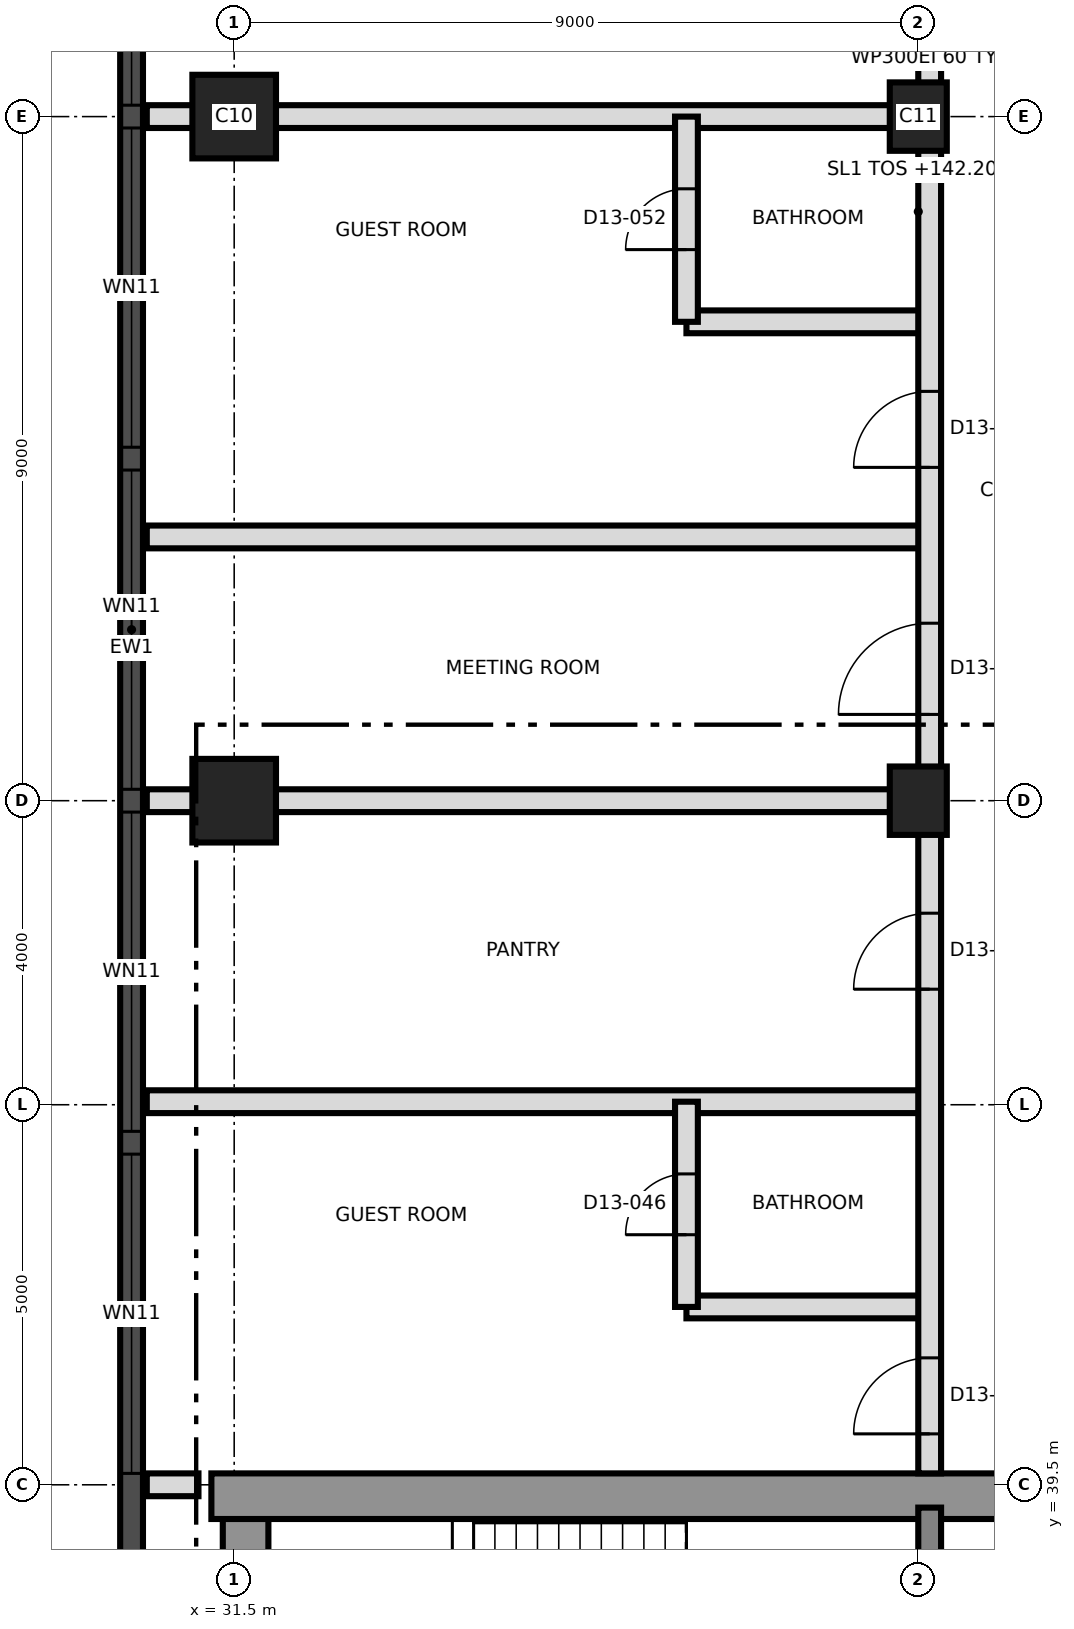
"""IFC4 building model, lengths in metres.
Left out: names, types, materials, properties, quantities, classifications, styles, units other than length and angle.
Written with IfcOpenShell. Run it as: python <this file> out.ifc"""

import sys

from ifc_helpers import new_model, si_unit, direction, frame, frame_2d, origin, origin_2d, place, context, subcontext, project, spatial, rectangle, extrude, element, fill, save


model = new_model("IFC4")
c1 = context("Model", 3, precision=1e-05, world=origin(), true_north=direction((0.0, 1.0)))
c2 = subcontext(c1, "Body", "Model", "MODEL_VIEW")
j1 = project(units=[si_unit("LENGTHUNIT", "METRE"), si_unit("PLANEANGLEUNIT", "RADIAN")], contexts=[c1])
p1 = place(None, origin())
s1 = spatial("IfcSite", under=j1, at=p1, CompositionType="ELEMENT")
p2 = place(p1, origin())
s2 = spatial("IfcBuilding", under=s1, at=p2, CompositionType="ELEMENT")
p3 = place(p2, frame((0.0, 0.0, 142.2)))
s3 = spatial("IfcBuildingStorey", under=s2, at=p3, CompositionType="ELEMENT", Elevation=142.2)
p4 = place(p3, frame((31.65, 21.8, 0.0), z_axis=(0.0, 0.0, 1.0), x_axis=(0.0, 1.0, 0.0)))
e1 = element("IfcWall", 1, at=p4, inside=s3, PredefinedType="SHEAR", context=c2, shape_type="SweptSolid", body=[
    extrude(rectangle(XDim=17.4, YDim=0.6, at=frame_2d((8.7, 0.0))), origin(), (0.0, 0.0, 1.0), 3.7),
])
p5 = place(p3, frame((31.2, 39.35, 0.0), z_axis=(0.0, 0.0, 1.0), x_axis=(1.0, 0.0, 0.0)))
e2 = element("IfcWall", 2, at=p5, inside=s3, PredefinedType="SHEAR", context=c2, shape_type="SweptSolid", body=[
    extrude(rectangle(XDim=27.0, YDim=0.6, at=frame_2d((13.5, 0.0))), origin(), (0.0, 0.0, 1.0), 3.7),
])
p6 = place(p5, frame((10.5, 0.0, 0.0)))
e3 = element("IfcOpeningElement", 3, at=p6, cuts=e2, PredefinedType="OPENING", context=c2, shape_type="SweptSolid", body=[
    extrude(rectangle(XDim=1.2, YDim=2.1, at=frame_2d((0.6, 1.05))), frame((0.0, 0.31, 0.0), z_axis=(0.0, -1.0, 0.0), x_axis=(1.0, 0.0, 0.0)), (0.0, 0.0, 1.0), 0.62),
])
p7 = place(p3, frame((40.65, 33.5, 0.0), z_axis=(0.0, 0.0, 1.0), x_axis=(0.0, 1.0, 0.0)))
e4 = element("IfcWall", 4, at=p7, inside=s3, PredefinedType="SHEAR", context=c2, shape_type="SweptSolid", body=[
    extrude(rectangle(XDim=5.7, YDim=0.3, at=frame_2d((2.85, 0.0))), origin(), (0.0, 0.0, 1.0), 3.7),
])
p8 = place(p3, frame((31.5, 48.5, 0.0), z_axis=(0.0, 0.0, 1.0), x_axis=(1.0, 0.0, 0.0)))
e5 = element("IfcColumn", 5, at=p8, inside=s3, PredefinedType="COLUMN", context=c2, shape_type="SweptSolid", body=[
    extrude(rectangle(XDim=1.1, YDim=1.1, at=origin_2d()), origin(), (0.0, 0.0, 1.0), 3.7),
])
p9 = place(p3, frame((40.5, 48.5, 0.0), z_axis=(0.0, 0.0, 1.0), x_axis=(0.0, 1.0, 0.0)))
e6 = element("IfcColumn", 6, at=p9, inside=s3, PredefinedType="COLUMN", context=c2, shape_type="SweptSolid", body=[
    extrude(rectangle(XDim=0.9, YDim=0.75, at=origin_2d()), origin(), (0.0, 0.0, 1.0), 3.7),
])
p10 = place(p3, frame((31.5, 57.5, 0.0), z_axis=(0.0, 0.0, 1.0), x_axis=(1.0, 0.0, 0.0)))
e7 = element("IfcColumn", 7, at=p10, inside=s3, PredefinedType="COLUMN", context=c2, shape_type="SweptSolid", body=[
    extrude(rectangle(XDim=1.1, YDim=1.1, at=origin_2d()), origin(), (0.0, 0.0, 1.0), 3.7),
])
p11 = place(p3, frame((40.5, 57.5, 0.0), z_axis=(0.0, 0.0, 1.0), x_axis=(0.0, 1.0, 0.0)))
e8 = element("IfcColumn", 8, at=p11, inside=s3, PredefinedType="COLUMN", context=c2, shape_type="SweptSolid", body=[
    extrude(rectangle(XDim=0.9, YDim=0.75, at=origin_2d()), origin(), (0.0, 0.0, 1.0), 3.7),
])
p12 = place(p3, frame((30.15, 66.992, 0.0), z_axis=(0.0, 0.0, 1.0), x_axis=(0.0, -1.0, 0.0)))
e9 = element("IfcWall", 9, at=p12, inside=s3, PredefinedType="SOLIDWALL", context=c2, shape_type="SweptSolid", body=[
    extrude(rectangle(XDim=32.968, YDim=0.3, at=frame_2d((16.484, 0.0))), origin(), (0.0, 0.0, 1.0), 3.4),
])
p13 = place(p12, frame((1.596, 0.0, 0.3)))
e10 = element("IfcOpeningElement", 10, at=p13, cuts=e9, PredefinedType="OPENING", context=c2, shape_type="SweptSolid", body=[
    extrude(rectangle(XDim=1.8, YDim=2.4, at=frame_2d((0.9, 1.2))), frame((0.0, 0.16, 0.0), z_axis=(0.0, -1.0, 0.0), x_axis=(1.0, 0.0, 0.0)), (0.0, 0.0, 1.0), 0.32),
])
p14 = place(p12, frame((5.142, 0.0, 0.9)))
e11 = element("IfcOpeningElement", 11, at=p14, cuts=e9, PredefinedType="OPENING", context=c2, shape_type="SweptSolid", body=[
    extrude(rectangle(XDim=4.2, YDim=1.5, at=frame_2d((2.1, 0.75))), frame((0.0, 0.16, 0.0), z_axis=(0.0, -1.0, 0.0), x_axis=(1.0, 0.0, 0.0)), (0.0, 0.0, 1.0), 0.32),
])
p15 = place(p12, frame((9.642, 0.0, 0.9)))
e12 = element("IfcOpeningElement", 12, at=p15, cuts=e9, PredefinedType="OPENING", context=c2, shape_type="SweptSolid", body=[
    extrude(rectangle(XDim=4.2, YDim=1.5, at=frame_2d((2.1, 0.75))), frame((0.0, 0.16, 0.0), z_axis=(0.0, -1.0, 0.0), x_axis=(1.0, 0.0, 0.0)), (0.0, 0.0, 1.0), 0.32),
])
p16 = place(p12, frame((14.142, 0.0, 0.9)))
e13 = element("IfcOpeningElement", 13, at=p16, cuts=e9, PredefinedType="OPENING", context=c2, shape_type="SweptSolid", body=[
    extrude(rectangle(XDim=4.2, YDim=1.5, at=frame_2d((2.1, 0.75))), frame((0.0, 0.16, 0.0), z_axis=(0.0, -1.0, 0.0), x_axis=(1.0, 0.0, 0.0)), (0.0, 0.0, 1.0), 0.32),
])
p17 = place(p12, frame((18.642, 0.0, 0.9)))
e14 = element("IfcOpeningElement", 14, at=p17, cuts=e9, PredefinedType="OPENING", context=c2, shape_type="SweptSolid", body=[
    extrude(rectangle(XDim=4.2, YDim=1.5, at=frame_2d((2.1, 0.75))), frame((0.0, 0.16, 0.0), z_axis=(0.0, -1.0, 0.0), x_axis=(1.0, 0.0, 0.0)), (0.0, 0.0, 1.0), 0.32),
])
p18 = place(p12, frame((23.142, 0.0, 0.9)))
e15 = element("IfcOpeningElement", 15, at=p18, cuts=e9, PredefinedType="OPENING", context=c2, shape_type="SweptSolid", body=[
    extrude(rectangle(XDim=4.2, YDim=1.5, at=frame_2d((2.1, 0.75))), frame((0.0, 0.16, 0.0), z_axis=(0.0, -1.0, 0.0), x_axis=(1.0, 0.0, 0.0)), (0.0, 0.0, 1.0), 0.32),
])
p19 = place(p12, frame((29.33, 0.0, 0.3)))
e16 = element("IfcOpeningElement", 16, at=p19, cuts=e9, PredefinedType="OPENING", context=c2, shape_type="SweptSolid", body=[
    extrude(rectangle(XDim=1.8, YDim=2.4, at=frame_2d((0.9, 1.2))), frame((0.0, 0.16, 0.0), z_axis=(0.0, -1.0, 0.0), x_axis=(1.0, 0.0, 0.0)), (0.0, 0.0, 1.0), 0.32),
])
p20 = place(p3, frame((30.35, 39.5, 0.0), z_axis=(0.0, 0.0, 1.0), x_axis=(1.0, 0.0, 0.0)))
e17 = element("IfcWall", 17, at=p20, inside=s3, PredefinedType="PARTITIONING", context=c2, shape_type="SweptSolid", body=[
    extrude(rectangle(XDim=0.68, YDim=0.3, at=frame_2d((0.34, 0.0))), origin(), (0.0, 0.0, 1.0), 3.4),
])
p21 = place(p3, frame((37.45, 41.84, 0.0), z_axis=(0.0, 0.0, 1.0), x_axis=(1.0, 0.0, 0.0)))
e18 = element("IfcWall", 18, at=p21, inside=s3, PredefinedType="PARTITIONING", context=c2, shape_type="SweptSolid", body=[
    extrude(rectangle(XDim=3.2, YDim=0.3, at=frame_2d((1.6, 0.0))), origin(), (0.0, 0.0, 1.0), 3.4),
])
for number, where, z_axis, x_axis in (
    (19, (30.35, 44.54, 0.0), (0.0, 0.0, 1.0), (1.0, 0.0, 0.0)),
    (20, (30.35, 48.5, 0.0), (0.0, 0.0, 1.0), (1.0, 0.0, 0.0)),
    (21, (30.35, 51.97, 0.0), (0.0, 0.0, 1.0), (1.0, 0.0, 0.0)),
):
    element("IfcWall", number, at=place(p3, frame(where, z_axis=z_axis, x_axis=x_axis)), inside=s3, PredefinedType="PARTITIONING", context=c2, shape_type="SweptSolid", body=[
        extrude(rectangle(XDim=10.3, YDim=0.3, at=frame_2d((5.15, 0.0))), origin(), (0.0, 0.0, 1.0), 3.4),
    ])
p22 = place(p3, frame((37.45, 54.8, 0.0), z_axis=(0.0, 0.0, 1.0), x_axis=(1.0, 0.0, 0.0)))
e22 = element("IfcWall", 22, at=p22, inside=s3, PredefinedType="PARTITIONING", context=c2, shape_type="SweptSolid", body=[
    extrude(rectangle(XDim=3.2, YDim=0.3, at=frame_2d((1.6, 0.0))), origin(), (0.0, 0.0, 1.0), 3.4),
])
p23 = place(p3, frame((30.35, 57.5, 0.0), z_axis=(0.0, 0.0, 1.0), x_axis=(1.0, 0.0, 0.0)))
e23 = element("IfcWall", 23, at=p23, inside=s3, PredefinedType="PARTITIONING", context=c2, shape_type="SweptSolid", body=[
    extrude(rectangle(XDim=10.3, YDim=0.3, at=frame_2d((5.15, 0.0))), origin(), (0.0, 0.0, 1.0), 3.4),
])
p24 = place(p3, frame((37.45, 41.84, 0.0), z_axis=(0.0, 0.0, 1.0), x_axis=(0.0, 1.0, 0.0)))
e24 = element("IfcWall", 24, at=p24, inside=s3, PredefinedType="PARTITIONING", context=c2, shape_type="SweptSolid", body=[
    extrude(rectangle(XDim=2.7, YDim=0.3, at=frame_2d((1.35, 0.0))), origin(), (0.0, 0.0, 1.0), 3.4),
])
p25 = place(p24, frame((0.95, 0.0, 0.0)))
e25 = element("IfcOpeningElement", 25, at=p25, cuts=e24, PredefinedType="OPENING", context=c2, shape_type="SweptSolid", body=[
    extrude(rectangle(XDim=0.8, YDim=2.1, at=frame_2d((0.4, 1.05))), frame((0.0, 0.16, 0.0), z_axis=(0.0, -1.0, 0.0), x_axis=(1.0, 0.0, 0.0)), (0.0, 0.0, 1.0), 0.32),
])
p26 = place(p3, frame((37.45, 54.8, 0.0), z_axis=(0.0, 0.0, 1.0), x_axis=(0.0, 1.0, 0.0)))
e26 = element("IfcWall", 26, at=p26, inside=s3, PredefinedType="PARTITIONING", context=c2, shape_type="SweptSolid", body=[
    extrude(rectangle(XDim=2.7, YDim=0.3, at=frame_2d((1.35, 0.0))), origin(), (0.0, 0.0, 1.0), 3.4),
])
p27 = place(p26, frame((0.95, 0.0, 0.0)))
e27 = element("IfcOpeningElement", 27, at=p27, cuts=e26, PredefinedType="OPENING", context=c2, shape_type="SweptSolid", body=[
    extrude(rectangle(XDim=0.8, YDim=2.1, at=frame_2d((0.4, 1.05))), frame((0.0, 0.16, 0.0), z_axis=(0.0, -1.0, 0.0), x_axis=(1.0, 0.0, 0.0)), (0.0, 0.0, 1.0), 0.32),
])
p28 = place(p3, frame((40.65, 39.65, 0.0), z_axis=(0.0, 0.0, 1.0), x_axis=(0.0, 1.0, 0.0)))
e28 = element("IfcWall", 28, at=p28, inside=s3, PredefinedType="PARTITIONING", context=c2, shape_type="SweptSolid", body=[
    extrude(rectangle(XDim=37.24, YDim=0.3, at=frame_2d((18.62, 0.0))), origin(), (0.0, 0.0, 1.0), 3.4),
])
p29 = place(p28, frame((0.52, 0.0, 0.0)))
e29 = element("IfcOpeningElement", 29, at=p29, cuts=e28, PredefinedType="OPENING", context=c2, shape_type="SweptSolid", body=[
    extrude(rectangle(XDim=1.0, YDim=2.1, at=frame_2d((0.5, 1.05))), frame((0.0, 0.16, 0.0), z_axis=(0.0, -1.0, 0.0), x_axis=(1.0, 0.0, 0.0)), (0.0, 0.0, 1.0), 0.32),
])
p30 = place(p28, frame((6.37, 0.0, 0.0)))
e30 = element("IfcOpeningElement", 30, at=p30, cuts=e28, PredefinedType="OPENING", context=c2, shape_type="SweptSolid", body=[
    extrude(rectangle(XDim=1.0, YDim=2.1, at=frame_2d((0.5, 1.05))), frame((0.0, 0.16, 0.0), z_axis=(0.0, -1.0, 0.0), x_axis=(1.0, 0.0, 0.0)), (0.0, 0.0, 1.0), 0.32),
])
p31 = place(p28, frame((9.985, 0.0, 0.0)))
e31 = element("IfcOpeningElement", 31, at=p31, cuts=e28, PredefinedType="OPENING", context=c2, shape_type="SweptSolid", body=[
    extrude(rectangle(XDim=1.2, YDim=2.1, at=frame_2d((0.6, 1.05))), frame((0.0, 0.16, 0.0), z_axis=(0.0, -1.0, 0.0), x_axis=(1.0, 0.0, 0.0)), (0.0, 0.0, 1.0), 0.32),
])
p32 = place(p28, frame((13.235, 0.0, 0.0)))
e32 = element("IfcOpeningElement", 32, at=p32, cuts=e28, PredefinedType="OPENING", context=c2, shape_type="SweptSolid", body=[
    extrude(rectangle(XDim=1.0, YDim=2.1, at=frame_2d((0.5, 1.05))), frame((0.0, 0.16, 0.0), z_axis=(0.0, -1.0, 0.0), x_axis=(1.0, 0.0, 0.0)), (0.0, 0.0, 1.0), 0.32),
])
p33 = place(p28, frame((21.35, 0.0, 0.0)))
e33 = element("IfcOpeningElement", 33, at=p33, cuts=e28, PredefinedType="OPENING", context=c2, shape_type="SweptSolid", body=[
    extrude(rectangle(XDim=1.0, YDim=2.4, at=frame_2d((0.5, 1.2))), frame((0.0, 0.16, 0.0), z_axis=(0.0, -1.0, 0.0), x_axis=(1.0, 0.0, 0.0)), (0.0, 0.0, 1.0), 0.32),
])
p34 = place(p14, origin())
e34 = element("IfcWindow", 34, at=p34, inside=s3, PartitioningType="SINGLE_PANEL", PredefinedType="WINDOW", context=c2, shape_type="SweptSolid", body=[
    extrude(rectangle(XDim=4.2, YDim=1.5, at=frame_2d((2.1, 0.75))), frame((0.0, 0.03, 0.0), z_axis=(0.0, -1.0, 0.0), x_axis=(1.0, 0.0, 0.0)), (0.0, 0.0, 1.0), 0.06),
])
fill(e11, e34)
p35 = place(p15, origin())
e35 = element("IfcWindow", 35, at=p35, inside=s3, PartitioningType="SINGLE_PANEL", PredefinedType="WINDOW", context=c2, shape_type="SweptSolid", body=[
    extrude(rectangle(XDim=4.2, YDim=1.5, at=frame_2d((2.1, 0.75))), frame((0.0, 0.03, 0.0), z_axis=(0.0, -1.0, 0.0), x_axis=(1.0, 0.0, 0.0)), (0.0, 0.0, 1.0), 0.06),
])
fill(e12, e35)
p36 = place(p16, origin())
e36 = element("IfcWindow", 36, at=p36, inside=s3, PartitioningType="SINGLE_PANEL", PredefinedType="WINDOW", context=c2, shape_type="SweptSolid", body=[
    extrude(rectangle(XDim=4.2, YDim=1.5, at=frame_2d((2.1, 0.75))), frame((0.0, 0.03, 0.0), z_axis=(0.0, -1.0, 0.0), x_axis=(1.0, 0.0, 0.0)), (0.0, 0.0, 1.0), 0.06),
])
fill(e13, e36)
p37 = place(p17, origin())
e37 = element("IfcWindow", 37, at=p37, inside=s3, PartitioningType="SINGLE_PANEL", PredefinedType="WINDOW", context=c2, shape_type="SweptSolid", body=[
    extrude(rectangle(XDim=4.2, YDim=1.5, at=frame_2d((2.1, 0.75))), frame((0.0, 0.03, 0.0), z_axis=(0.0, -1.0, 0.0), x_axis=(1.0, 0.0, 0.0)), (0.0, 0.0, 1.0), 0.06),
])
fill(e14, e37)
p38 = place(p18, origin())
e38 = element("IfcWindow", 38, at=p38, inside=s3, PartitioningType="SINGLE_PANEL", PredefinedType="WINDOW", context=c2, shape_type="SweptSolid", body=[
    extrude(rectangle(XDim=4.2, YDim=1.5, at=frame_2d((2.1, 0.75))), frame((0.0, 0.03, 0.0), z_axis=(0.0, -1.0, 0.0), x_axis=(1.0, 0.0, 0.0)), (0.0, 0.0, 1.0), 0.06),
])
fill(e15, e38)
p39 = place(p25, origin())
e39 = element("IfcDoor", 39, at=p39, inside=s3, OperationType="SINGLE_SWING_LEFT", PredefinedType="DOOR", context=c2, shape_type="SweptSolid", body=[
    extrude(rectangle(XDim=0.8, YDim=2.1, at=frame_2d((0.4, 1.05))), frame((0.0, 0.025, 0.0), z_axis=(0.0, -1.0, 0.0), x_axis=(1.0, 0.0, 0.0)), (0.0, 0.0, 1.0), 0.05),
])
fill(e25, e39)
p40 = place(p29, origin())
e40 = element("IfcDoor", 40, at=p40, inside=s3, OperationType="SINGLE_SWING_RIGHT", PredefinedType="DOOR", context=c2, shape_type="SweptSolid", body=[
    extrude(rectangle(XDim=1.0, YDim=2.1, at=frame_2d((0.5, 1.05))), frame((0.0, 0.025, 0.0), z_axis=(0.0, -1.0, 0.0), x_axis=(1.0, 0.0, 0.0)), (0.0, 0.0, 1.0), 0.05),
])
fill(e29, e40)
p41 = place(p30, origin())
e41 = element("IfcDoor", 41, at=p41, inside=s3, OperationType="SINGLE_SWING_LEFT", PredefinedType="DOOR", context=c2, shape_type="SweptSolid", body=[
    extrude(rectangle(XDim=1.0, YDim=2.1, at=frame_2d((0.5, 1.05))), frame((0.0, 0.025, 0.0), z_axis=(0.0, -1.0, 0.0), x_axis=(1.0, 0.0, 0.0)), (0.0, 0.0, 1.0), 0.05),
])
fill(e30, e41)
p42 = place(p31, origin())
e42 = element("IfcDoor", 42, at=p42, inside=s3, OperationType="SINGLE_SWING_LEFT", PredefinedType="DOOR", context=c2, shape_type="SweptSolid", body=[
    extrude(rectangle(XDim=1.2, YDim=2.1, at=frame_2d((0.6, 1.05))), frame((0.0, 0.025, 0.0), z_axis=(0.0, -1.0, 0.0), x_axis=(1.0, 0.0, 0.0)), (0.0, 0.0, 1.0), 0.05),
])
fill(e31, e42)
p43 = place(p27, origin())
e43 = element("IfcDoor", 43, at=p43, inside=s3, OperationType="SINGLE_SWING_LEFT", PredefinedType="DOOR", context=c2, shape_type="SweptSolid", body=[
    extrude(rectangle(XDim=0.8, YDim=2.1, at=frame_2d((0.4, 1.05))), frame((0.0, 0.025, 0.0), z_axis=(0.0, -1.0, 0.0), x_axis=(1.0, 0.0, 0.0)), (0.0, 0.0, 1.0), 0.05),
])
fill(e27, e43)
p44 = place(p32, origin())
e44 = element("IfcDoor", 44, at=p44, inside=s3, OperationType="SINGLE_SWING_RIGHT", PredefinedType="DOOR", context=c2, shape_type="SweptSolid", body=[
    extrude(rectangle(XDim=1.0, YDim=2.1, at=frame_2d((0.5, 1.05))), frame((0.0, 0.025, 0.0), z_axis=(0.0, -1.0, 0.0), x_axis=(1.0, 0.0, 0.0)), (0.0, 0.0, 1.0), 0.05),
])
fill(e32, e44)
save(model, sys.argv[1])
